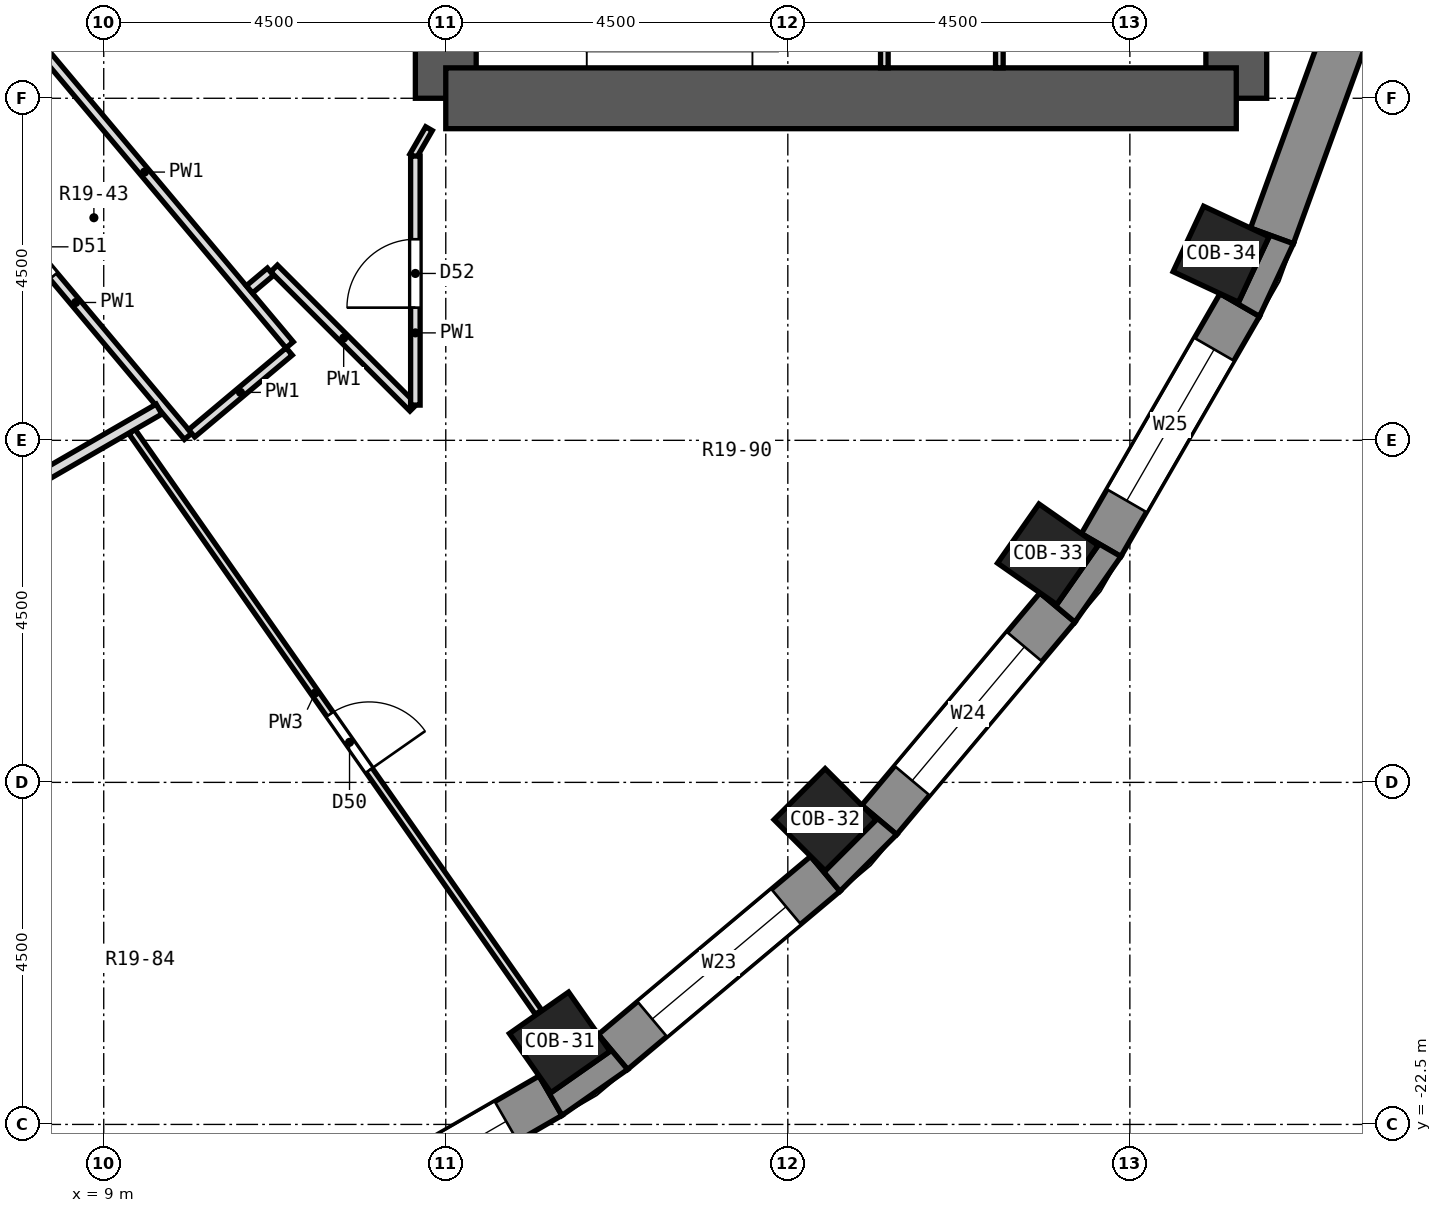
"""IFC4 building model, lengths in metres.
Left out: names, types, materials, properties, quantities, classifications, styles, units other than length and angle.
Written with IfcOpenShell. Run it as: python <this file> out.ifc"""

import sys

from ifc_helpers import new_model, si_unit, direction, frame, frame_2d, origin, origin_2d, place, context, subcontext, project, spatial, polyline, rectangle, outline, extrude, element, fill, save


model = new_model("IFC4")
c1 = context("Model", 3, precision=1e-05, world=origin(), true_north=direction((0.0, 1.0)))
c2 = subcontext(c1, "Body", "Model", "MODEL_VIEW")
j1 = project(units=[si_unit("LENGTHUNIT", "METRE"), si_unit("PLANEANGLEUNIT", "RADIAN")], contexts=[c1])
p1 = place(None, origin())
s1 = spatial("IfcSite", under=j1, at=p1, CompositionType="ELEMENT")
p2 = place(p1, origin())
s2 = spatial("IfcBuilding", under=s1, at=p2, CompositionType="ELEMENT")
p3 = place(p2, frame((0.0, 0.0, 111.7)))
s3 = spatial("IfcBuildingStorey", under=s2, at=p3, CompositionType="ELEMENT", Elevation=111.7)
for number, where, z_axis, x_axis in (
    (1, (14.999, -21.421, 0.0), (0.0, 0.0, 1.0), (0.574, -0.819, 0.0)),
    (2, (18.491, -18.491, 0.0), (0.0, 0.0, 1.0), (0.707, -0.707, 0.0)),
    (3, (21.421, -14.999, 0.0), (0.0, 0.0, 1.0), (0.819, -0.574, 0.0)),
    (4, (23.7, -11.052, 0.0), (0.0, 0.0, 1.0), (0.906, -0.423, 0.0)),
):
    element("IfcColumn", number, at=place(p3, frame(where, z_axis=z_axis, x_axis=x_axis)), inside=s3, PredefinedType="COLUMN", context=c2, shape_type="SweptSolid", body=[
        extrude(rectangle(XDim=0.95, YDim=0.95, at=origin_2d()), origin(), (0.0, 0.0, 1.0), 3.3),
    ])
p4 = place(p3, frame((13.5, -9.0, 0.0), z_axis=(0.0, 0.0, 1.0), x_axis=(0.0, 1.0, 0.0)))
e5 = element("IfcWall", 5, at=p4, inside=s3, PredefinedType="SHEAR", context=c2, shape_type="SweptSolid", body=[
    extrude(rectangle(XDim=18.0, YDim=0.8, at=frame_2d((9.0, 0.0))), origin(), (0.0, 0.0, 1.0), 3.3),
])
p5 = place(p4, frame((15.4, 0.0, 0.0)))
e6 = element("IfcOpeningElement", 6, at=p5, cuts=e5, PredefinedType="OPENING", context=c2, shape_type="SweptSolid", body=[
    extrude(rectangle(XDim=1.2, YDim=2.1, at=frame_2d((0.6, 1.05))), frame((0.0, 0.412, 0.0), z_axis=(0.0, -1.0, 0.0), x_axis=(1.0, 0.0, 0.0)), (0.0, 0.0, 1.0), 0.824),
])
p6 = place(p4, frame((1.4, 0.0, 0.0)))
e7 = element("IfcOpeningElement", 7, at=p6, cuts=e5, PredefinedType="OPENING", context=c2, shape_type="SweptSolid", body=[
    extrude(rectangle(XDim=1.2, YDim=2.1, at=frame_2d((0.6, 1.05))), frame((0.0, 0.412, 0.0), z_axis=(0.0, -1.0, 0.0), x_axis=(1.0, 0.0, 0.0)), (0.0, 0.0, 1.0), 0.824),
])
p7 = place(p4, frame((7.5, 0.0, 0.0)))
e8 = element("IfcOpeningElement", 8, at=p7, cuts=e5, PredefinedType="OPENING", context=c2, shape_type="SweptSolid", body=[
    extrude(rectangle(XDim=3.0, YDim=2.4, at=frame_2d((1.5, 1.2))), frame((0.0, 0.412, 0.0), z_axis=(0.0, -1.0, 0.0), x_axis=(1.0, 0.0, 0.0)), (0.0, 0.0, 1.0), 0.824),
])
p8 = place(p3, frame((23.9, -9.0, 0.0), z_axis=(0.0, 0.0, 1.0), x_axis=(0.0, 1.0, 0.0)))
e9 = element("IfcWall", 9, at=p8, inside=s3, PredefinedType="SHEAR", context=c2, shape_type="SweptSolid", body=[
    extrude(rectangle(XDim=18.0, YDim=0.8, at=frame_2d((9.0, 0.0))), origin(), (0.0, 0.0, 1.0), 3.3),
])
p9 = place(p3, frame((13.5, -9.0, 0.0), z_axis=(0.0, 0.0, 1.0), x_axis=(1.0, 0.0, 0.0)))
e10 = element("IfcWall", 10, at=p9, inside=s3, PredefinedType="SHEAR", context=c2, shape_type="SweptSolid", body=[
    extrude(rectangle(XDim=10.4, YDim=0.8, at=frame_2d((5.2, 0.0))), origin(), (0.0, 0.0, 1.0), 3.3),
])
p10 = place(p3, frame((11.719, -23.946, 0.0), z_axis=(0.0, 0.0, 1.0), x_axis=(0.866051847062, 0.499954196102, 0.0)))
e11 = element("IfcWall", 11, at=p10, inside=s3, PredefinedType="SOLIDWALL", context=c2, shape_type="SweptSolid", body=[
    extrude(rectangle(XDim=3.648, YDim=0.6, at=frame_2d((1.824, 0.0))), origin(), (0.0, 0.0, 1.0), 2.8),
])
p11 = place(p10, frame((0.674, 0.0, 0.9)))
e12 = element("IfcOpeningElement", 12, at=p11, cuts=e11, PredefinedType="OPENING", context=c2, shape_type="SweptSolid", body=[
    extrude(rectangle(XDim=2.3, YDim=1.8, at=frame_2d((1.15, 0.9))), frame((0.0, 0.312, 0.0), z_axis=(0.0, -1.0, 0.0), x_axis=(1.0, 0.0, 0.0)), (0.0, 0.0, 1.0), 0.624),
])
p12 = place(p3, frame((15.699, -21.547, 0.0), z_axis=(0.0, 0.0, 1.0), x_axis=(0.766055462616, 0.642774476932, 0.0)))
e13 = element("IfcWall", 13, at=p12, inside=s3, PredefinedType="SOLIDWALL", context=c2, shape_type="SweptSolid", body=[
    extrude(rectangle(XDim=3.648, YDim=0.6, at=frame_2d((1.824, 0.0))), origin(), (0.0, 0.0, 1.0), 2.8),
])
p13 = place(p12, frame((0.674, 0.0, 0.9)))
e14 = element("IfcOpeningElement", 14, at=p13, cuts=e13, PredefinedType="OPENING", context=c2, shape_type="SweptSolid", body=[
    extrude(rectangle(XDim=2.3, YDim=1.8, at=frame_2d((1.15, 0.9))), frame((0.0, 0.312, 0.0), z_axis=(0.0, -1.0, 0.0), x_axis=(1.0, 0.0, 0.0)), (0.0, 0.0, 1.0), 0.624),
])
p14 = place(p3, frame((19.202, -18.494, 0.0), z_axis=(0.0, 0.0, 1.0), x_axis=(0.642774476932, 0.766055462616, 0.0)))
e15 = element("IfcWall", 15, at=p14, inside=s3, PredefinedType="SOLIDWALL", context=c2, shape_type="SweptSolid", body=[
    extrude(rectangle(XDim=3.648, YDim=0.6, at=frame_2d((1.824, 0.0))), origin(), (0.0, 0.0, 1.0), 2.8),
])
p15 = place(p14, frame((0.674, 0.0, 0.9)))
e16 = element("IfcOpeningElement", 16, at=p15, cuts=e15, PredefinedType="OPENING", context=c2, shape_type="SweptSolid", body=[
    extrude(rectangle(XDim=2.3, YDim=1.8, at=frame_2d((1.15, 0.9))), frame((0.0, 0.312, 0.0), z_axis=(0.0, -1.0, 0.0), x_axis=(1.0, 0.0, 0.0)), (0.0, 0.0, 1.0), 0.624),
])
p16 = place(p3, frame((22.122, -14.878, 0.0), z_axis=(0.0, 0.0, 1.0), x_axis=(0.499954196102, 0.866051847062, 0.0)))
e17 = element("IfcWall", 17, at=p16, inside=s3, PredefinedType="SOLIDWALL", context=c2, shape_type="SweptSolid", body=[
    extrude(rectangle(XDim=3.648, YDim=0.6, at=frame_2d((1.824, 0.0))), origin(), (0.0, 0.0, 1.0), 2.8),
])
p17 = place(p16, frame((0.674, 0.0, 0.9)))
e18 = element("IfcOpeningElement", 18, at=p17, cuts=e17, PredefinedType="OPENING", context=c2, shape_type="SweptSolid", body=[
    extrude(rectangle(XDim=2.3, YDim=1.8, at=frame_2d((1.15, 0.9))), frame((0.0, 0.312, 0.0), z_axis=(0.0, -1.0, 0.0), x_axis=(1.0, 0.0, 0.0)), (0.0, 0.0, 1.0), 0.624),
])
p18 = place(p3, frame((24.369, -10.811, 0.0), z_axis=(0.0, 0.0, 1.0), x_axis=(0.341990236633, 0.939703505393, 0.0)))
e19 = element("IfcWall", 19, at=p18, inside=s3, PredefinedType="SOLIDWALL", context=c2, shape_type="SweptSolid", body=[
    extrude(rectangle(XDim=3.648, YDim=0.6, at=frame_2d((1.824, 0.0))), origin(), (0.0, 0.0, 1.0), 2.8),
])
p19 = place(p3, origin())
e20 = element("IfcWall", 20, at=p19, inside=s3, PredefinedType="SOLIDWALL", context=c2, shape_type="SweptSolid", body=[
    extrude(outline(polyline([(15.892, -21.777), (15.506, -21.317), (15.661, -21.538), (14.882, -22.083), (14.728, -21.862), (15.028, -22.382), (15.892, -21.777)])), origin(), (0.0, 0.0, 1.0), 2.8),
])
p20 = place(p3, origin())
e21 = element("IfcWall", 21, at=p20, inside=s3, PredefinedType="SOLIDWALL", context=c2, shape_type="SweptSolid", body=[
    extrude(outline(polyline([(18.686, -19.432), (19.432, -18.686), (18.972, -18.301), (19.163, -18.491), (18.491, -19.163), (18.301, -18.972), (18.686, -19.432)])), origin(), (0.0, 0.0, 1.0), 2.8),
])
p21 = place(p3, origin())
e22 = element("IfcWall", 22, at=p21, inside=s3, PredefinedType="SOLIDWALL", context=c2, shape_type="SweptSolid", body=[
    extrude(outline(polyline([(22.382, -15.028), (21.862, -14.728), (22.083, -14.882), (21.538, -15.661), (21.317, -15.506), (21.777, -15.892), (22.382, -15.028)])), origin(), (0.0, 0.0, 1.0), 2.8),
])
p22 = place(p3, origin())
e23 = element("IfcWall", 23, at=p22, inside=s3, PredefinedType="SOLIDWALL", context=c2, shape_type="SweptSolid", body=[
    extrude(outline(polyline([(24.651, -10.913), (24.087, -10.708), (24.331, -10.822), (23.93, -11.683), (23.686, -11.569), (24.206, -11.869), (24.651, -10.913)])), origin(), (0.0, 0.0, 1.0), 2.8),
])
p23 = place(p3, frame((9.371, -13.385, 0.0), z_axis=(0.0, 0.0, 1.0), x_axis=(0.573555460551, -0.819166731302, 0.0)))
e24 = element("IfcWall", 24, at=p23, inside=s3, PredefinedType="PARTITIONING", context=c2, shape_type="SweptSolid", body=[
    extrude(rectangle(XDim=9.326, YDim=0.1, at=frame_2d((4.663, 0.0))), origin(), (0.0, 0.0, 1.0), 2.8),
])
p24 = place(p23, frame((4.541, 0.0, 0.0)))
e25 = element("IfcOpeningElement", 25, at=p24, cuts=e24, PredefinedType="OPENING", context=c2, shape_type="SweptSolid", body=[
    extrude(rectangle(XDim=0.9, YDim=2.1, at=frame_2d((0.45, 1.05))), frame((0.0, 0.062, 0.0), z_axis=(0.0, -1.0, 0.0), x_axis=(1.0, 0.0, 0.0)), (0.0, 0.0, 1.0), 0.124),
])
p25 = place(p3, frame((6.253, -8.852, 0.0), z_axis=(0.0, 0.0, 1.0), x_axis=(0.642738639283, -0.766085531499, 0.0)))
e26 = element("IfcWall", 26, at=p25, inside=s3, PredefinedType="PARTITIONING", context=c2, shape_type="SweptSolid", body=[
    extrude(rectangle(XDim=5.999, YDim=0.125, at=frame_2d((3.0, 0.0))), origin(), (0.0, 0.0, 1.0), 2.8),
])
p26 = place(p25, frame((2.244, 0.0, 0.0)))
e27 = element("IfcOpeningElement", 27, at=p26, cuts=e26, PredefinedType="OPENING", context=c2, shape_type="SweptSolid", body=[
    extrude(rectangle(XDim=1.0, YDim=2.1, at=frame_2d((0.5, 1.05))), frame((0.0, 0.074, 0.0), z_axis=(0.0, -1.0, 0.0), x_axis=(1.0, 0.0, 0.0)), (0.0, 0.0, 1.0), 0.149),
])
p27 = place(p3, frame((7.629, -7.698, 0.0), z_axis=(0.0, 0.0, 1.0), x_axis=(0.642971202284, -0.76589035314, 0.0)))
e28 = element("IfcWall", 28, at=p27, inside=s3, PredefinedType="PARTITIONING", context=c2, shape_type="SweptSolid", body=[
    extrude(rectangle(XDim=5.937, YDim=0.125, at=frame_2d((2.968, 0.0))), origin(), (0.0, 0.0, 1.0), 2.8),
])
p28 = place(p3, frame((11.241, -11.239, 0.0), z_axis=(0.0, 0.0, 1.0), x_axis=(0.707106781187, -0.707106781187, 0.0)))
e29 = element("IfcWall", 29, at=p28, inside=s3, PredefinedType="PARTITIONING", context=c2, shape_type="SweptSolid", body=[
    extrude(rectangle(XDim=2.591, YDim=0.125, at=frame_2d((1.295, 0.0))), origin(), (0.0, 0.0, 1.0), 2.8),
])
p29 = place(p3, frame((4.328, -16.208, 0.0), z_axis=(0.0, 0.0, 1.0), x_axis=(0.865952126022, 0.500126899334, 0.0)))
e30 = element("IfcWall", 30, at=p29, inside=s3, PredefinedType="PARTITIONING", context=c2, shape_type="SweptSolid", body=[
    extrude(rectangle(XDim=6.235, YDim=0.15, at=frame_2d((3.118, 0.0))), origin(), (0.0, 0.0, 1.0), 2.8),
])
p30 = place(p3, frame((10.157, -13.408, 0.0), z_axis=(0.0, 0.0, 1.0), x_axis=(0.766066523004, 0.642761294986, 0.0)))
e31 = element("IfcWall", 31, at=p30, inside=s3, PredefinedType="PARTITIONING", context=c2, shape_type="SweptSolid", body=[
    extrude(rectangle(XDim=1.675, YDim=0.125, at=frame_2d((0.837, 0.0))), origin(), (0.0, 0.0, 1.0), 2.8),
])
p31 = place(p3, frame((10.917, -11.514, 0.0), z_axis=(0.0, 0.0, 1.0), x_axis=(0.765718201941, 0.643176208527, 0.0)))
e32 = element("IfcWall", 32, at=p31, inside=s3, PredefinedType="PARTITIONING", context=c2, shape_type="SweptSolid", body=[
    extrude(rectangle(XDim=0.361, YDim=0.125, at=frame_2d((0.18, 0.0))), origin(), (0.0, 0.0, 1.0), 2.8),
])
p32 = place(p3, frame((13.071, -9.76, 0.0), z_axis=(0.0, 0.0, 1.0), x_axis=(0.500179786662, 0.865921579021, 0.0)))
e33 = element("IfcWall", 33, at=p32, inside=s3, PredefinedType="PARTITIONING", context=c2, shape_type="SweptSolid", body=[
    extrude(rectangle(XDim=0.416, YDim=0.1, at=frame_2d((0.208, 0.0))), origin(), (0.0, 0.0, 1.0), 2.8),
])
p33 = place(p3, frame((13.1, -13.037, 0.0), z_axis=(0.0, 0.0, 1.0), x_axis=(0.0, 1.0, 0.0)))
e34 = element("IfcWall", 34, at=p33, inside=s3, PredefinedType="PARTITIONING", context=c2, shape_type="SweptSolid", body=[
    extrude(rectangle(XDim=3.277, YDim=0.125, at=frame_2d((1.638, 0.0))), origin(), (0.0, 0.0, 1.0), 2.8),
])
p34 = place(p33, frame((1.282, 0.0, 0.0)))
e35 = element("IfcOpeningElement", 35, at=p34, cuts=e34, PredefinedType="OPENING", context=c2, shape_type="SweptSolid", body=[
    extrude(rectangle(XDim=0.9, YDim=2.1, at=frame_2d((0.45, 1.05))), frame((0.0, 0.074, 0.0), z_axis=(0.0, -1.0, 0.0), x_axis=(1.0, 0.0, 0.0)), (0.0, 0.0, 1.0), 0.149),
])
for number, where, z_axis, x_axis in (
    (36, (19.27, -8.6, 0.0), (0.0, 0.0, 1.0), (0.0, 1.0, 0.0)),
    (37, (20.783, -8.6, 0.0), (0.0, 0.0, 1.0), (0.0, 1.0, 0.0)),
):
    element("IfcWall", number, at=place(p3, frame(where, z_axis=z_axis, x_axis=x_axis)), inside=s3, PredefinedType="PARTITIONING", context=c2, shape_type="SweptSolid", body=[
        extrude(rectangle(XDim=3.35, YDim=0.1, at=frame_2d((1.675, 0.0))), origin(), (0.0, 0.0, 1.0), 2.8),
    ])
p35 = place(p11, origin())
e38 = element("IfcWindow", 38, at=p35, inside=s3, PartitioningType="SINGLE_PANEL", PredefinedType="WINDOW", context=c2, shape_type="SweptSolid", body=[
    extrude(rectangle(XDim=2.3, YDim=1.8, at=frame_2d((1.15, 0.9))), frame((0.0, 0.18, 0.0), z_axis=(0.0, -1.0, 0.0), x_axis=(1.0, 0.0, 0.0)), (0.0, 0.0, 1.0), 0.06),
])
fill(e12, e38)
p36 = place(p13, origin())
e39 = element("IfcWindow", 39, at=p36, inside=s3, PartitioningType="SINGLE_PANEL", PredefinedType="WINDOW", context=c2, shape_type="SweptSolid", body=[
    extrude(rectangle(XDim=2.3, YDim=1.8, at=frame_2d((1.15, 0.9))), frame((0.0, 0.18, 0.0), z_axis=(0.0, -1.0, 0.0), x_axis=(1.0, 0.0, 0.0)), (0.0, 0.0, 1.0), 0.06),
])
fill(e14, e39)
p37 = place(p15, origin())
e40 = element("IfcWindow", 40, at=p37, inside=s3, PartitioningType="SINGLE_PANEL", PredefinedType="WINDOW", context=c2, shape_type="SweptSolid", body=[
    extrude(rectangle(XDim=2.3, YDim=1.8, at=frame_2d((1.15, 0.9))), frame((0.0, 0.18, 0.0), z_axis=(0.0, -1.0, 0.0), x_axis=(1.0, 0.0, 0.0)), (0.0, 0.0, 1.0), 0.06),
])
fill(e16, e40)
p38 = place(p17, origin())
e41 = element("IfcWindow", 41, at=p38, inside=s3, PartitioningType="SINGLE_PANEL", PredefinedType="WINDOW", context=c2, shape_type="SweptSolid", body=[
    extrude(rectangle(XDim=2.3, YDim=1.8, at=frame_2d((1.15, 0.9))), frame((0.0, 0.18, 0.0), z_axis=(0.0, -1.0, 0.0), x_axis=(1.0, 0.0, 0.0)), (0.0, 0.0, 1.0), 0.06),
])
fill(e18, e41)
p39 = place(p24, origin())
e42 = element("IfcDoor", 42, at=p39, inside=s3, OperationType="SINGLE_SWING_RIGHT", PredefinedType="DOOR", context=c2, shape_type="SweptSolid", body=[
    extrude(rectangle(XDim=0.9, YDim=2.1, at=frame_2d((0.45, 1.05))), frame((0.0, 0.025, 0.0), z_axis=(0.0, -1.0, 0.0), x_axis=(1.0, 0.0, 0.0)), (0.0, 0.0, 1.0), 0.05),
])
fill(e25, e42)
p40 = place(p26, frame((1.0, 0.0, 0.0), z_axis=(0.0, 0.0, 1.0), x_axis=(-1.0, 0.0, 0.0)))
e43 = element("IfcDoor", 43, at=p40, inside=s3, OperationType="SINGLE_SWING_RIGHT", PredefinedType="DOOR", context=c2, shape_type="SweptSolid", body=[
    extrude(rectangle(XDim=1.0, YDim=2.1, at=frame_2d((0.5, 1.05))), frame((0.0, 0.025, 0.0), z_axis=(0.0, -1.0, 0.0), x_axis=(1.0, 0.0, 0.0)), (0.0, 0.0, 1.0), 0.05),
])
fill(e27, e43)
p41 = place(p34, origin())
e44 = element("IfcDoor", 44, at=p41, inside=s3, OperationType="SINGLE_SWING_LEFT", PredefinedType="DOOR", context=c2, shape_type="SweptSolid", body=[
    extrude(rectangle(XDim=0.9, YDim=2.1, at=frame_2d((0.45, 1.05))), frame((0.0, 0.025, 0.0), z_axis=(0.0, -1.0, 0.0), x_axis=(1.0, 0.0, 0.0)), (0.0, 0.0, 1.0), 0.05),
])
fill(e35, e44)
save(model, sys.argv[1])
